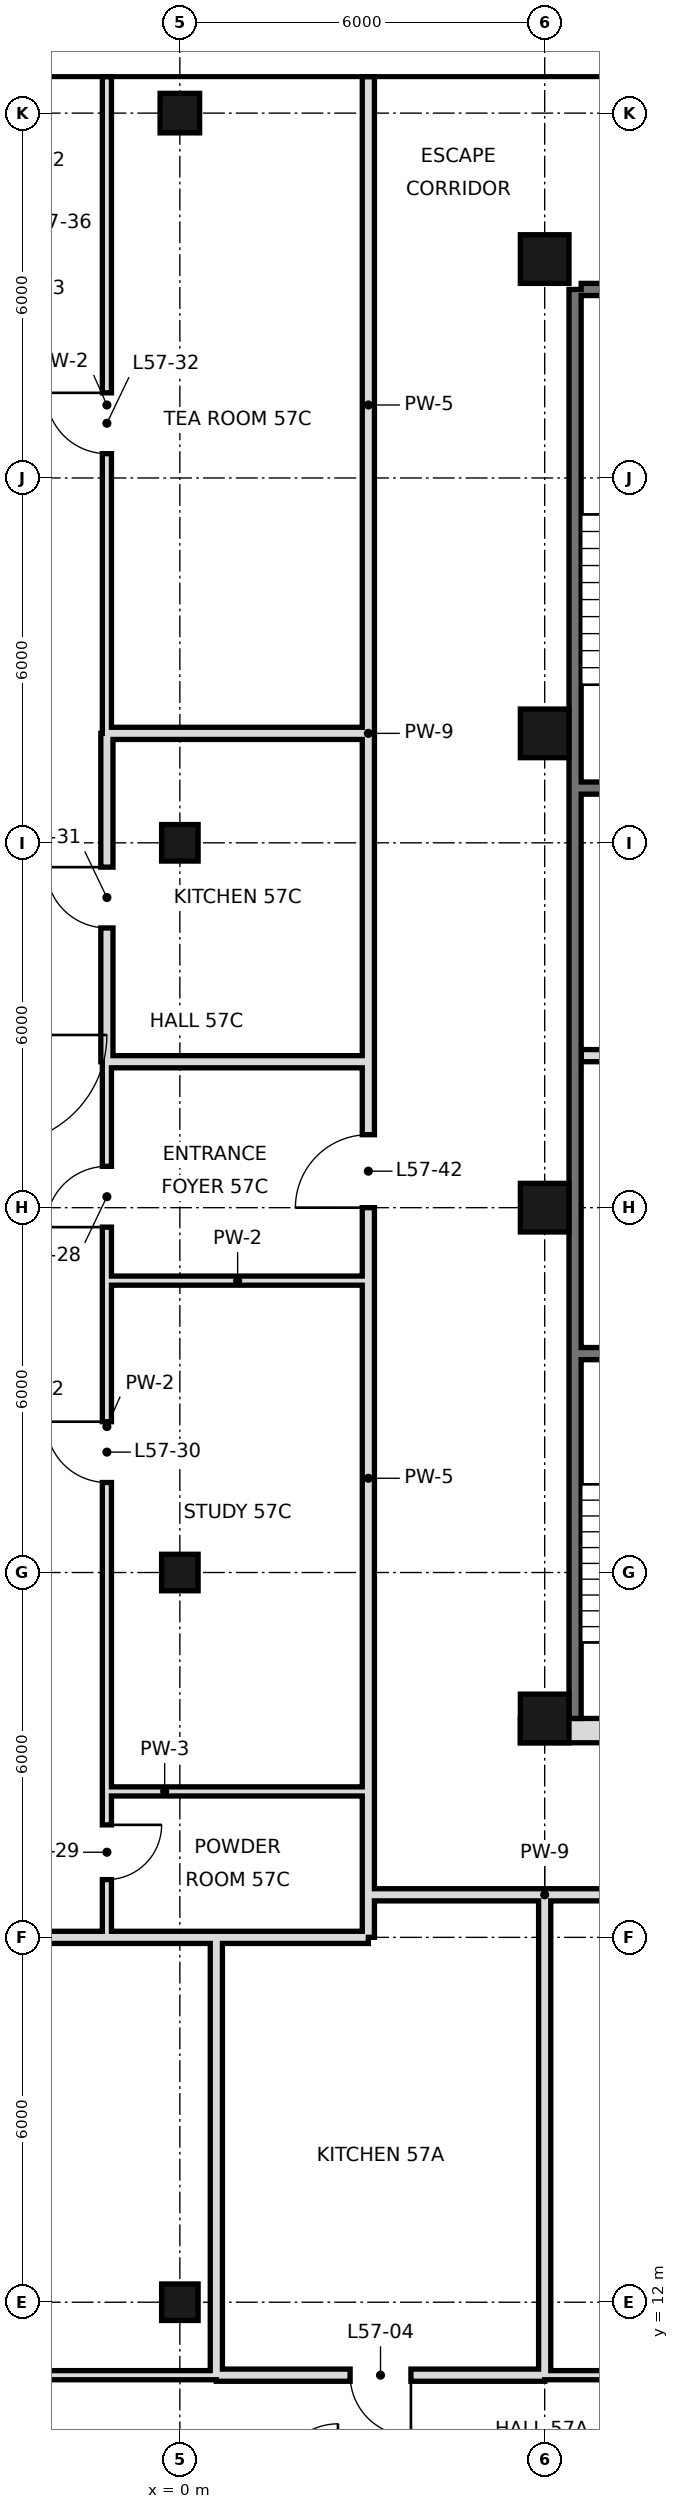
"""IFC4 building model, lengths in metres.
Left out: names, types, materials, properties, quantities, classifications, styles, units other than length and angle.
Written with IfcOpenShell. Run it as: python <this file> out.ifc"""

import sys

from ifc_helpers import new_model, si_unit, direction, frame, frame_2d, origin, origin_2d, place, context, subcontext, project, spatial, rectangle, hollow_rectangle, extrude, element, fill, save


model = new_model("IFC4")
c1 = context("Model", 3, precision=1e-05, world=origin(), true_north=direction((0.0, 1.0)))
c2 = subcontext(c1, "Body", "Model", "MODEL_VIEW")
j1 = project(units=[si_unit("LENGTHUNIT", "METRE"), si_unit("PLANEANGLEUNIT", "RADIAN")], contexts=[c1])
p1 = place(None, origin())
s1 = spatial("IfcSite", under=j1, at=p1, CompositionType="ELEMENT")
p2 = place(p1, origin())
s2 = spatial("IfcBuilding", under=s1, at=p2, CompositionType="ELEMENT")
p3 = place(p2, frame((0.0, 0.0, 243.2)))
s3 = spatial("IfcBuildingStorey", under=s2, at=p3, CompositionType="ELEMENT", Elevation=243.2)
for number, where, z_axis, x_axis in (
    (1, (0.0, 12.0, 0.0), (0.0, 0.0, 1.0), (1.0, 0.0, 0.0)),
    (2, (0.0, 24.0, 0.0), (0.0, 0.0, 1.0), (1.0, 0.0, 0.0)),
    (3, (0.0, 36.0, 0.0), (0.0, 0.0, 1.0), (1.0, 0.0, 0.0)),
):
    element("IfcColumn", number, at=place(p3, frame(where, z_axis=z_axis, x_axis=x_axis)), inside=s3, PredefinedType="COLUMN", context=c2, shape_type="SweptSolid", body=[
        extrude(hollow_rectangle(XDim=0.6, YDim=0.6, WallThickness=0.028, at=origin_2d()), origin(), (0.0, 0.0, 1.0), 3.6),
    ])
p4 = place(p3, frame((0.0, 48.0, 0.0), z_axis=(0.0, 0.0, 1.0), x_axis=(1.0, 0.0, 0.0)))
e4 = element("IfcColumn", 4, at=p4, inside=s3, PredefinedType="COLUMN", context=c2, shape_type="SweptSolid", body=[
    extrude(hollow_rectangle(XDim=0.65, YDim=0.65, WallThickness=0.032, at=origin_2d()), origin(), (0.0, 0.0, 1.0), 3.6),
])
for number, where, z_axis, x_axis in (
    (5, (6.0, 21.6, 0.0), (0.0, 0.0, 1.0), (1.0, 0.0, 0.0)),
    (6, (6.0, 30.0, 0.0), (0.0, 0.0, 1.0), (1.0, 0.0, 0.0)),
    (7, (6.0, 37.8, 0.0), (0.0, 0.0, 1.0), (1.0, 0.0, 0.0)),
    (8, (6.0, 45.6, 0.0), (0.0, 0.0, 1.0), (1.0, 0.0, 0.0)),
):
    element("IfcColumn", number, at=place(p3, frame(where, z_axis=z_axis, x_axis=x_axis)), inside=s3, PredefinedType="COLUMN", context=c2, shape_type="SweptSolid", body=[
        extrude(hollow_rectangle(XDim=0.8, YDim=0.8, WallThickness=0.04, at=origin_2d()), origin(), (0.0, 0.0, 1.0), 3.6),
    ])
p5 = place(p3, frame((-1.2, 32.4, 0.0), z_axis=(0.0, 0.0, 1.0), x_axis=(0.0, 1.0, 0.0)))
e9 = element("IfcWall", 9, at=p5, inside=s3, PredefinedType="SOLIDWALL", context=c2, shape_type="SweptSolid", body=[
    extrude(rectangle(XDim=5.4, YDim=0.2, at=frame_2d((2.7, 0.0))), origin(), (0.0, 0.0, 1.0), 2.72),
])
p6 = place(p5, frame((2.2, 0.0, 0.0)))
e10 = element("IfcOpeningElement", 10, at=p6, cuts=e9, PredefinedType="OPENING", context=c2, shape_type="SweptSolid", body=[
    extrude(rectangle(XDim=1.0, YDim=2.4, at=frame_2d((0.5, 1.2))), frame((0.0, 0.11, 0.0), z_axis=(0.0, -1.0, 0.0), x_axis=(1.0, 0.0, 0.0)), (0.0, 0.0, 1.0), 0.22),
])
p7 = place(p3, frame((-1.2, 20.4, 0.0), z_axis=(0.0, 0.0, 1.0), x_axis=(0.0, 1.0, 0.0)))
e11 = element("IfcWall", 11, at=p7, inside=s3, PredefinedType="PARTITIONING", context=c2, shape_type="SweptSolid", body=[
    extrude(rectangle(XDim=12.0, YDim=0.15, at=frame_2d((6.0, 0.0))), origin(), (0.0, 0.0, 1.0), 3.42),
])
p8 = place(p7, frame((9.28, 0.0, 0.0)))
e12 = element("IfcOpeningElement", 12, at=p8, cuts=e11, PredefinedType="OPENING", context=c2, shape_type="SweptSolid", body=[
    extrude(rectangle(XDim=1.0, YDim=2.4, at=frame_2d((0.5, 1.2))), frame((0.0, 0.085, 0.0), z_axis=(0.0, -1.0, 0.0), x_axis=(1.0, 0.0, 0.0)), (0.0, 0.0, 1.0), 0.17),
])
p9 = place(p7, frame((5.08, 0.0, 0.0)))
e13 = element("IfcOpeningElement", 13, at=p9, cuts=e11, PredefinedType="OPENING", context=c2, shape_type="SweptSolid", body=[
    extrude(rectangle(XDim=1.0, YDim=2.4, at=frame_2d((0.5, 1.2))), frame((0.0, 0.085, 0.0), z_axis=(0.0, -1.0, 0.0), x_axis=(1.0, 0.0, 0.0)), (0.0, 0.0, 1.0), 0.17),
])
p10 = place(p3, frame((-1.2, 37.8, 0.0), z_axis=(0.0, 0.0, 1.0), x_axis=(0.0, 1.0, 0.0)))
e14 = element("IfcWall", 14, at=p10, inside=s3, PredefinedType="PARTITIONING", context=c2, shape_type="SweptSolid", body=[
    extrude(rectangle(XDim=10.8, YDim=0.15, at=frame_2d((5.4, 0.0))), origin(), (0.0, 0.0, 1.0), 3.42),
])
p11 = place(p10, frame((4.6, 0.0, 0.0)))
e15 = element("IfcOpeningElement", 15, at=p11, cuts=e14, PredefinedType="OPENING", context=c2, shape_type="SweptSolid", body=[
    extrude(rectangle(XDim=1.0, YDim=2.4, at=frame_2d((0.5, 1.2))), frame((0.0, 0.085, 0.0), z_axis=(0.0, -1.0, 0.0), x_axis=(1.0, 0.0, 0.0)), (0.0, 0.0, 1.0), 0.17),
])
p12 = place(p3, frame((-1.2, 18.0, 0.0), z_axis=(0.0, 0.0, 1.0), x_axis=(0.0, 1.0, 0.0)))
e16 = element("IfcWall", 16, at=p12, inside=s3, PredefinedType="PARTITIONING", context=c2, shape_type="SweptSolid", body=[
    extrude(rectangle(XDim=2.4, YDim=0.15, at=frame_2d((1.2, 0.0))), origin(), (0.0, 0.0, 1.0), 3.42),
])
p13 = place(p12, frame((0.95, 0.0, 0.0)))
e17 = element("IfcOpeningElement", 17, at=p13, cuts=e16, PredefinedType="OPENING", context=c2, shape_type="SweptSolid", body=[
    extrude(rectangle(XDim=0.9, YDim=2.4, at=frame_2d((0.45, 1.2))), frame((0.0, 0.085, 0.0), z_axis=(0.0, -1.0, 0.0), x_axis=(1.0, 0.0, 0.0)), (0.0, 0.0, 1.0), 0.17),
])
p14 = place(p3, frame((0.6, 10.8, 0.0), z_axis=(0.0, 0.0, 1.0), x_axis=(0.0, 1.0, 0.0)))
e18 = element("IfcWall", 18, at=p14, inside=s3, PredefinedType="SOLIDWALL", context=c2, shape_type="SweptSolid", body=[
    extrude(rectangle(XDim=7.2, YDim=0.2, at=frame_2d((3.6, 0.0))), origin(), (0.0, 0.0, 1.0), 2.72),
])
p15 = place(p3, frame((3.1, 18.7, 0.0), z_axis=(0.0, 0.0, 1.0), x_axis=(0.0, 1.0, 0.0)))
e19 = element("IfcWall", 19, at=p15, inside=s3, PredefinedType="SOLIDWALL", context=c2, shape_type="SweptSolid", body=[
    extrude(rectangle(XDim=13.7, YDim=0.2, at=frame_2d((6.85, 0.0))), origin(), (0.0, 0.0, 1.0), 2.97),
])
p16 = place(p15, frame((11.3, 0.0, 0.0)))
e20 = element("IfcOpeningElement", 20, at=p16, cuts=e19, PredefinedType="OPENING", context=c2, shape_type="SweptSolid", body=[
    extrude(rectangle(XDim=1.2, YDim=2.4, at=frame_2d((0.6, 1.2))), frame((0.0, 0.11, 0.0), z_axis=(0.0, -1.0, 0.0), x_axis=(1.0, 0.0, 0.0)), (0.0, 0.0, 1.0), 0.22),
])
p17 = place(p3, frame((3.1, 37.8, 0.0), z_axis=(0.0, 0.0, 1.0), x_axis=(0.0, 1.0, 0.0)))
e21 = element("IfcWall", 21, at=p17, inside=s3, PredefinedType="SOLIDWALL", context=c2, shape_type="SweptSolid", body=[
    extrude(rectangle(XDim=10.8, YDim=0.2, at=frame_2d((5.4, 0.0))), origin(), (0.0, 0.0, 1.0), 2.72),
])
p18 = place(p3, frame((3.1, 18.0, 0.0), z_axis=(0.0, 0.0, 1.0), x_axis=(0.0, 1.0, 0.0)))
e22 = element("IfcWall", 22, at=p18, inside=s3, PredefinedType="SOLIDWALL", context=c2, shape_type="SweptSolid", body=[
    extrude(rectangle(XDim=0.7, YDim=0.2, at=frame_2d((0.35, 0.0))), origin(), (0.0, 0.0, 1.0), 2.97),
])
p19 = place(p3, frame((3.1, 32.4, 0.0), z_axis=(0.0, 0.0, 1.0), x_axis=(0.0, 1.0, 0.0)))
e23 = element("IfcWall", 23, at=p19, inside=s3, PredefinedType="SOLIDWALL", context=c2, shape_type="SweptSolid", body=[
    extrude(rectangle(XDim=5.4, YDim=0.2, at=frame_2d((2.7, 0.0))), origin(), (0.0, 0.0, 1.0), 3.42),
])
p20 = place(p3, frame((6.0, 10.8, 0.0), z_axis=(0.0, 0.0, 1.0), x_axis=(0.0, 1.0, 0.0)))
e24 = element("IfcWall", 24, at=p20, inside=s3, PredefinedType="SOLIDWALL", context=c2, shape_type="SweptSolid", body=[
    extrude(rectangle(XDim=7.9, YDim=0.2, at=frame_2d((3.95, 0.0))), origin(), (0.0, 0.0, 1.0), 2.72),
])
p21 = place(p3, frame((0.6, 10.8, 0.0), z_axis=(0.0, 0.0, 1.0), x_axis=(1.0, 0.0, 0.0)))
e25 = element("IfcWall", 25, at=p21, inside=s3, PredefinedType="SOLIDWALL", context=c2, shape_type="SweptSolid", body=[
    extrude(rectangle(XDim=5.4, YDim=0.2, at=frame_2d((2.7, 0.0))), origin(), (0.0, 0.0, 1.0), 2.72),
])
p22 = place(p21, frame((2.2, 0.0, 0.0)))
e26 = element("IfcOpeningElement", 26, at=p22, cuts=e25, PredefinedType="OPENING", context=c2, shape_type="SweptSolid", body=[
    extrude(rectangle(XDim=1.0, YDim=2.4, at=frame_2d((0.5, 1.2))), frame((0.0, 0.11, 0.0), z_axis=(0.0, -1.0, 0.0), x_axis=(1.0, 0.0, 0.0)), (0.0, 0.0, 1.0), 0.22),
])
p23 = place(p3, frame((-9.6, 10.8, 0.0), z_axis=(0.0, 0.0, 1.0), x_axis=(1.0, 0.0, 0.0)))
e27 = element("IfcWall", 27, at=p23, inside=s3, PredefinedType="PARTITIONING", context=c2, shape_type="SweptSolid", body=[
    extrude(rectangle(XDim=10.2, YDim=0.15, at=frame_2d((5.1, 0.0))), origin(), (0.0, 0.0, 1.0), 3.42),
])
p24 = place(p23, frame((6.34, 0.0, 0.0)))
e28 = element("IfcOpeningElement", 28, at=p24, cuts=e27, PredefinedType="OPENING", context=c2, shape_type="SweptSolid", body=[
    extrude(rectangle(XDim=1.0, YDim=2.4, at=frame_2d((0.5, 1.2))), frame((0.0, 0.085, 0.0), z_axis=(0.0, -1.0, 0.0), x_axis=(1.0, 0.0, 0.0)), (0.0, 0.0, 1.0), 0.17),
])
p25 = place(p3, frame((6.0, 10.8, 0.0), z_axis=(0.0, 0.0, 1.0), x_axis=(1.0, 0.0, 0.0)))
e29 = element("IfcWall", 29, at=p25, inside=s3, PredefinedType="PARTITIONING", context=c2, shape_type="SweptSolid", body=[
    extrude(rectangle(XDim=29.4, YDim=0.15, at=frame_2d((14.7, 0.0))), origin(), (0.0, 0.0, 1.0), 3.42),
])
p26 = place(p25, frame((3.4, 0.0, 0.0)))
e30 = element("IfcOpeningElement", 30, at=p26, cuts=e29, PredefinedType="OPENING", context=c2, shape_type="SweptSolid", body=[
    extrude(rectangle(XDim=1.0, YDim=2.4, at=frame_2d((0.5, 1.2))), frame((0.0, 0.085, 0.0), z_axis=(0.0, -1.0, 0.0), x_axis=(1.0, 0.0, 0.0)), (0.0, 0.0, 1.0), 0.17),
])
p27 = place(p25, frame((9.4, 0.0, 0.0)))
e31 = element("IfcOpeningElement", 31, at=p27, cuts=e29, PredefinedType="OPENING", context=c2, shape_type="SweptSolid", body=[
    extrude(rectangle(XDim=1.0, YDim=2.4, at=frame_2d((0.5, 1.2))), frame((0.0, 0.085, 0.0), z_axis=(0.0, -1.0, 0.0), x_axis=(1.0, 0.0, 0.0)), (0.0, 0.0, 1.0), 0.17),
])
p28 = place(p25, frame((19.3, 0.0, 0.0)))
e32 = element("IfcOpeningElement", 32, at=p28, cuts=e29, PredefinedType="OPENING", context=c2, shape_type="SweptSolid", body=[
    extrude(rectangle(XDim=1.0, YDim=2.4, at=frame_2d((0.5, 1.2))), frame((0.0, 0.085, 0.0), z_axis=(0.0, -1.0, 0.0), x_axis=(1.0, 0.0, 0.0)), (0.0, 0.0, 1.0), 0.17),
])
p29 = place(p25, frame((25.0, 0.0, 0.0)))
e33 = element("IfcOpeningElement", 33, at=p29, cuts=e29, PredefinedType="OPENING", context=c2, shape_type="SweptSolid", body=[
    extrude(rectangle(XDim=1.0, YDim=2.4, at=frame_2d((0.5, 1.2))), frame((0.0, 0.085, 0.0), z_axis=(0.0, -1.0, 0.0), x_axis=(1.0, 0.0, 0.0)), (0.0, 0.0, 1.0), 0.17),
])
p30 = place(p3, frame((0.6, 18.0, 0.0), z_axis=(0.0, 0.0, 1.0), x_axis=(1.0, 0.0, 0.0)))
e34 = element("IfcWall", 34, at=p30, inside=s3, PredefinedType="SOLIDWALL", context=c2, shape_type="SweptSolid", body=[
    extrude(rectangle(XDim=2.5, YDim=0.2, at=frame_2d((1.25, 0.0))), origin(), (0.0, 0.0, 1.0), 2.97),
])
p31 = place(p3, frame((-12.6, 18.0, 0.0), z_axis=(0.0, 0.0, 1.0), x_axis=(1.0, 0.0, 0.0)))
e35 = element("IfcWall", 35, at=p31, inside=s3, PredefinedType="SOLIDWALL", context=c2, shape_type="SweptSolid", body=[
    extrude(rectangle(XDim=13.2, YDim=0.2, at=frame_2d((6.6, 0.0))), origin(), (0.0, 0.0, 1.0), 2.72),
])
p32 = place(p3, frame((6.0, 18.7, 0.0), z_axis=(0.0, 0.0, 1.0), x_axis=(1.0, 0.0, 0.0)))
e36 = element("IfcWall", 36, at=p32, inside=s3, PredefinedType="SOLIDWALL", context=c2, shape_type="SweptSolid", body=[
    extrude(rectangle(XDim=29.4, YDim=0.2, at=frame_2d((14.7, 0.0))), origin(), (0.0, 0.0, 1.0), 2.72),
])
p33 = place(p32, frame((1.54, 0.0, 0.0)))
e37 = element("IfcOpeningElement", 37, at=p33, cuts=e36, PredefinedType="OPENING", context=c2, shape_type="SweptSolid", body=[
    extrude(rectangle(XDim=1.2, YDim=2.4, at=frame_2d((0.6, 1.2))), frame((0.0, 0.11, 0.0), z_axis=(0.0, -1.0, 0.0), x_axis=(1.0, 0.0, 0.0)), (0.0, 0.0, 1.0), 0.22),
])
p34 = place(p32, frame((19.58, 0.0, 0.0)))
e38 = element("IfcOpeningElement", 38, at=p34, cuts=e36, PredefinedType="OPENING", context=c2, shape_type="SweptSolid", body=[
    extrude(rectangle(XDim=1.2, YDim=2.4, at=frame_2d((0.6, 1.2))), frame((0.0, 0.11, 0.0), z_axis=(0.0, -1.0, 0.0), x_axis=(1.0, 0.0, 0.0)), (0.0, 0.0, 1.0), 0.22),
])
p35 = place(p3, frame((3.1, 18.7, 0.0), z_axis=(0.0, 0.0, 1.0), x_axis=(1.0, 0.0, 0.0)))
e39 = element("IfcWall", 39, at=p35, inside=s3, PredefinedType="SOLIDWALL", context=c2, shape_type="SweptSolid", body=[
    extrude(rectangle(XDim=2.9, YDim=0.2, at=frame_2d((1.45, 0.0))), origin(), (0.0, 0.0, 1.0), 2.72),
])
for number, where, z_axis, x_axis in (
    (40, (-1.2, 20.4, 0.0), (0.0, 0.0, 1.0), (1.0, 0.0, 0.0)),
    (41, (-1.2, 28.8, 0.0), (0.0, 0.0, 1.0), (1.0, 0.0, 0.0)),
):
    element("IfcWall", number, at=place(p3, frame(where, z_axis=z_axis, x_axis=x_axis)), inside=s3, PredefinedType="PARTITIONING", context=c2, shape_type="SweptSolid", body=[
        extrude(rectangle(XDim=4.3, YDim=0.15, at=frame_2d((2.15, 0.0))), origin(), (0.0, 0.0, 1.0), 3.42),
    ])
for number, where, z_axis, x_axis in (
    (42, (-1.2, 32.4, 0.0), (0.0, 0.0, 1.0), (1.0, 0.0, 0.0)),
    (43, (-1.2, 37.8, 0.0), (0.0, 0.0, 1.0), (1.0, 0.0, 0.0)),
):
    element("IfcWall", number, at=place(p3, frame(where, z_axis=z_axis, x_axis=x_axis)), inside=s3, PredefinedType="SOLIDWALL", context=c2, shape_type="SweptSolid", body=[
        extrude(rectangle(XDim=4.3, YDim=0.2, at=frame_2d((2.15, 0.0))), origin(), (0.0, 0.0, 1.0), 2.72),
    ])
p36 = place(p3, frame((6.5, 21.6, 0.0), z_axis=(0.0, 0.0, 1.0), x_axis=(0.0, 1.0, 0.0)))
e44 = element("IfcWall", 44, at=p36, inside=s3, PredefinedType="SOLIDWALL", context=c2, shape_type="SweptSolid", body=[
    extrude(rectangle(XDim=23.5, YDim=0.2, at=frame_2d((11.75, 0.0))), origin(), (0.0, 0.0, 1.0), 3.42),
])
p37 = place(p3, frame((6.6, 45.1, 0.0), z_axis=(0.0, 0.0, 1.0), x_axis=(1.0, 0.0, 0.0)))
e45 = element("IfcWall", 45, at=p37, inside=s3, PredefinedType="SOLIDWALL", context=c2, shape_type="SweptSolid", body=[
    extrude(rectangle(XDim=34.8, YDim=0.2, at=frame_2d((17.4, 0.0))), origin(), (0.0, 0.0, 1.0), 3.42),
])
p38 = place(p3, frame((5.6, 21.4, 0.0), z_axis=(0.0, 0.0, 1.0), x_axis=(1.0, 0.0, 0.0)))
e46 = element("IfcWall", 46, at=p38, inside=s3, PredefinedType="SOLIDWALL", context=c2, shape_type="SweptSolid", body=[
    extrude(rectangle(XDim=36.8, YDim=0.4, at=frame_2d((18.4, 0.0))), origin(), (0.0, 0.0, 1.0), 3.42),
])
p39 = place(p38, frame((8.5, 0.0, 0.0)))
e47 = element("IfcOpeningElement", 47, at=p39, cuts=e46, PredefinedType="OPENING", context=c2, shape_type="SweptSolid", body=[
    extrude(rectangle(XDim=1.8, YDim=2.1, at=frame_2d((0.9, 1.05))), frame((0.0, 0.21, 0.0), z_axis=(0.0, -1.0, 0.0), x_axis=(1.0, 0.0, 0.0)), (0.0, 0.0, 1.0), 0.42),
])
p40 = place(p38, frame((17.5, 0.0, 0.0)))
e48 = element("IfcOpeningElement", 48, at=p40, cuts=e46, PredefinedType="OPENING", context=c2, shape_type="SweptSolid", body=[
    extrude(rectangle(XDim=1.8, YDim=2.1, at=frame_2d((0.9, 1.05))), frame((0.0, 0.21, 0.0), z_axis=(0.0, -1.0, 0.0), x_axis=(1.0, 0.0, 0.0)), (0.0, 0.0, 1.0), 0.42),
])
p41 = place(p38, frame((26.5, 0.0, 0.0)))
e49 = element("IfcOpeningElement", 49, at=p41, cuts=e46, PredefinedType="OPENING", context=c2, shape_type="SweptSolid", body=[
    extrude(rectangle(XDim=1.8, YDim=2.1, at=frame_2d((0.9, 1.05))), frame((0.0, 0.21, 0.0), z_axis=(0.0, -1.0, 0.0), x_axis=(1.0, 0.0, 0.0)), (0.0, 0.0, 1.0), 0.42),
])
p42 = place(p38, frame((4.5, 0.0, 0.0)))
e50 = element("IfcOpeningElement", 50, at=p42, cuts=e46, PredefinedType="OPENING", context=c2, shape_type="SweptSolid", body=[
    extrude(rectangle(XDim=1.2, YDim=2.1, at=frame_2d((0.6, 1.05))), frame((0.0, 0.21, 0.0), z_axis=(0.0, -1.0, 0.0), x_axis=(1.0, 0.0, 0.0)), (0.0, 0.0, 1.0), 0.42),
])
p43 = place(p38, frame((31.1, 0.0, 0.0)))
e51 = element("IfcOpeningElement", 51, at=p43, cuts=e46, PredefinedType="OPENING", context=c2, shape_type="SweptSolid", body=[
    extrude(rectangle(XDim=1.2, YDim=2.1, at=frame_2d((0.6, 1.05))), frame((0.0, 0.21, 0.0), z_axis=(0.0, -1.0, 0.0), x_axis=(1.0, 0.0, 0.0)), (0.0, 0.0, 1.0), 0.42),
])
p44 = place(p3, frame((6.6, 27.6, 0.0), z_axis=(0.0, 0.0, 1.0), x_axis=(1.0, 0.0, 0.0)))
e52 = element("IfcWall", 52, at=p44, inside=s3, PredefinedType="SOLIDWALL", context=c2, shape_type="SweptSolid", body=[
    extrude(rectangle(XDim=5.3, YDim=0.2, at=frame_2d((2.65, 0.0))), origin(), (0.0, 0.0, 1.0), 3.42),
])
p45 = place(p3, frame((6.6, 32.5, 0.0), z_axis=(0.0, 0.0, 1.0), x_axis=(1.0, 0.0, 0.0)))
e53 = element("IfcWall", 53, at=p45, inside=s3, PredefinedType="PARTITIONING", context=c2, shape_type="SweptSolid", body=[
    extrude(rectangle(XDim=2.7, YDim=0.2, at=frame_2d((1.35, 0.0))), origin(), (0.0, 0.0, 1.0), 3.42),
])
p46 = place(p3, frame((6.6, 36.9, 0.0), z_axis=(0.0, 0.0, 1.0), x_axis=(1.0, 0.0, 0.0)))
e54 = element("IfcWall", 54, at=p46, inside=s3, PredefinedType="SOLIDWALL", context=c2, shape_type="SweptSolid", body=[
    extrude(rectangle(XDim=2.7, YDim=0.2, at=frame_2d((1.35, 0.0))), origin(), (0.0, 0.0, 1.0), 3.42),
])
p47 = place(p22, origin())
e55 = element("IfcDoor", 55, at=p47, inside=s3, OperationType="SINGLE_SWING_RIGHT", PredefinedType="DOOR", context=c2, shape_type="SweptSolid", body=[
    extrude(rectangle(XDim=1.0, YDim=2.4, at=frame_2d((0.5, 1.2))), frame((0.0, 0.025, 0.0), z_axis=(0.0, -1.0, 0.0), x_axis=(1.0, 0.0, 0.0)), (0.0, 0.0, 1.0), 0.05),
])
fill(e26, e55)
p48 = place(p8, origin())
e56 = element("IfcDoor", 56, at=p48, inside=s3, OperationType="SINGLE_SWING_LEFT", PredefinedType="DOOR", context=c2, shape_type="SweptSolid", body=[
    extrude(rectangle(XDim=1.0, YDim=2.4, at=frame_2d((0.5, 1.2))), frame((0.0, 0.025, 0.0), z_axis=(0.0, -1.0, 0.0), x_axis=(1.0, 0.0, 0.0)), (0.0, 0.0, 1.0), 0.05),
])
fill(e12, e56)
p49 = place(p13, origin())
e57 = element("IfcDoor", 57, at=p49, inside=s3, OperationType="SINGLE_SWING_RIGHT", PredefinedType="DOOR", context=c2, shape_type="SweptSolid", body=[
    extrude(rectangle(XDim=0.9, YDim=2.4, at=frame_2d((0.45, 1.2))), frame((0.0, 0.025, 0.0), z_axis=(0.0, -1.0, 0.0), x_axis=(1.0, 0.0, 0.0)), (0.0, 0.0, 1.0), 0.05),
])
fill(e17, e57)
p50 = place(p9, frame((1.0, 0.0, 0.0), z_axis=(0.0, 0.0, 1.0), x_axis=(-1.0, 0.0, 0.0)))
e58 = element("IfcDoor", 58, at=p50, inside=s3, OperationType="SINGLE_SWING_LEFT", PredefinedType="DOOR", context=c2, shape_type="SweptSolid", body=[
    extrude(rectangle(XDim=1.0, YDim=2.4, at=frame_2d((0.5, 1.2))), frame((0.0, 0.025, 0.0), z_axis=(0.0, -1.0, 0.0), x_axis=(1.0, 0.0, 0.0)), (0.0, 0.0, 1.0), 0.05),
])
fill(e13, e58)
p51 = place(p6, frame((1.0, 0.0, 0.0), z_axis=(0.0, 0.0, 1.0), x_axis=(-1.0, 0.0, 0.0)))
e59 = element("IfcDoor", 59, at=p51, inside=s3, OperationType="SINGLE_SWING_LEFT", PredefinedType="DOOR", context=c2, shape_type="SweptSolid", body=[
    extrude(rectangle(XDim=1.0, YDim=2.4, at=frame_2d((0.5, 1.2))), frame((0.0, 0.025, 0.0), z_axis=(0.0, -1.0, 0.0), x_axis=(1.0, 0.0, 0.0)), (0.0, 0.0, 1.0), 0.05),
])
fill(e10, e59)
p52 = place(p11, frame((1.0, 0.0, 0.0), z_axis=(0.0, 0.0, 1.0), x_axis=(-1.0, 0.0, 0.0)))
e60 = element("IfcDoor", 60, at=p52, inside=s3, OperationType="SINGLE_SWING_LEFT", PredefinedType="DOOR", context=c2, shape_type="SweptSolid", body=[
    extrude(rectangle(XDim=1.0, YDim=2.4, at=frame_2d((0.5, 1.2))), frame((0.0, 0.025, 0.0), z_axis=(0.0, -1.0, 0.0), x_axis=(1.0, 0.0, 0.0)), (0.0, 0.0, 1.0), 0.05),
])
fill(e15, e60)
p53 = place(p16, origin())
e61 = element("IfcDoor", 61, at=p53, inside=s3, OperationType="SINGLE_SWING_LEFT", PredefinedType="DOOR", context=c2, shape_type="SweptSolid", body=[
    extrude(rectangle(XDim=1.2, YDim=2.4, at=frame_2d((0.6, 1.2))), frame((0.0, 0.025, 0.0), z_axis=(0.0, -1.0, 0.0), x_axis=(1.0, 0.0, 0.0)), (0.0, 0.0, 1.0), 0.05),
])
fill(e20, e61)
save(model, sys.argv[1])
